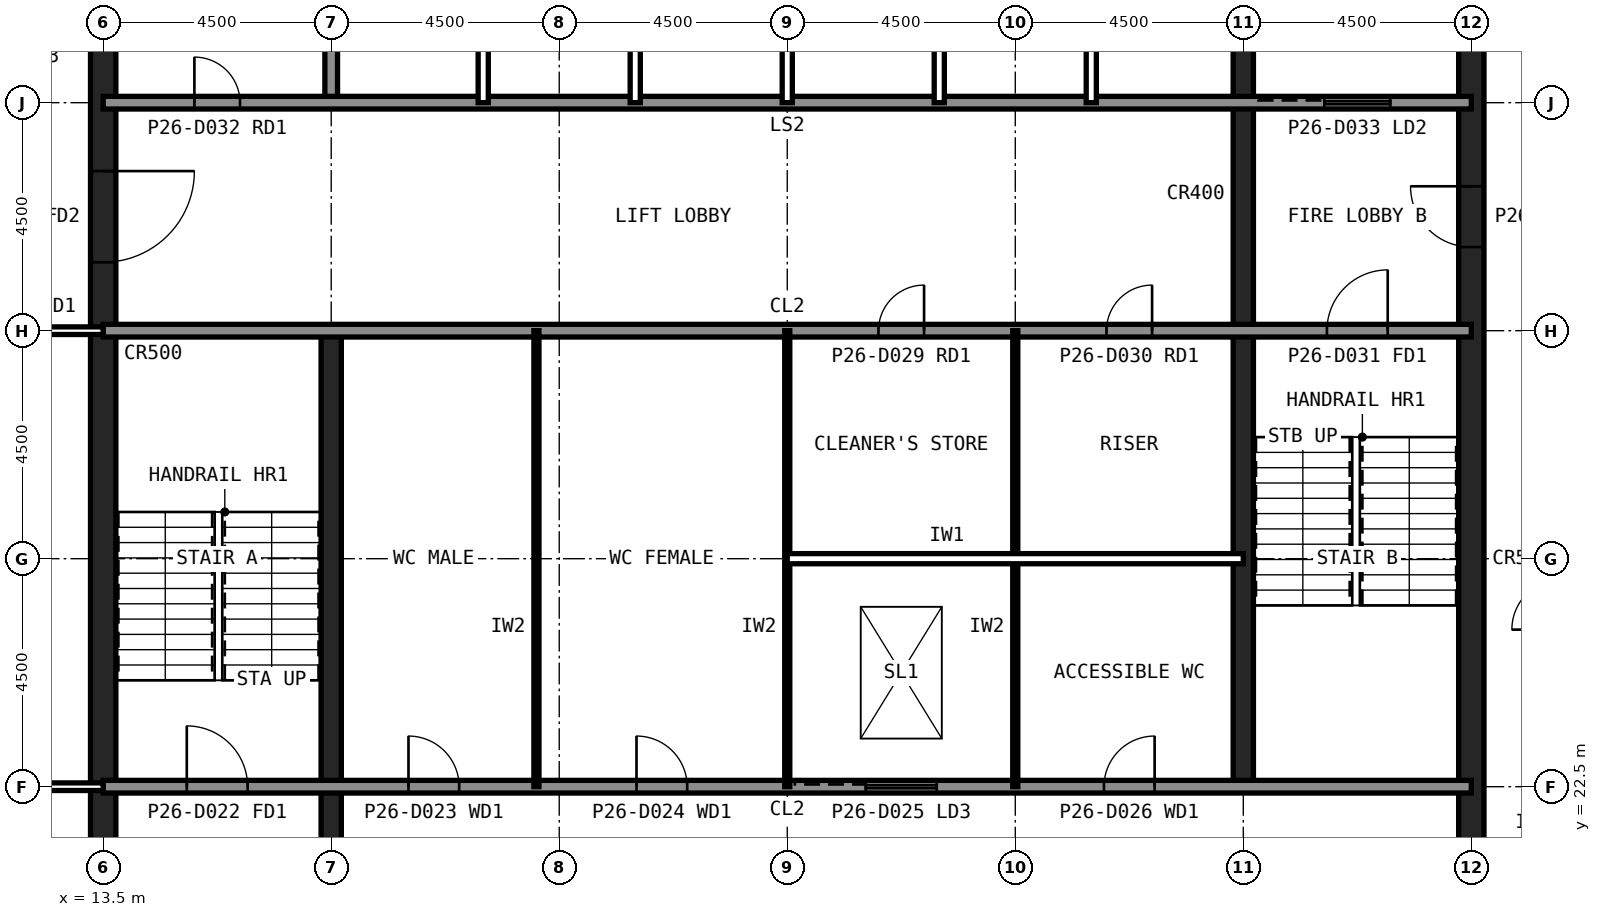
"""IFC4 building model, lengths in metres.
Left out: names, types, materials, properties, quantities, classifications, styles, units other than length and angle.
Written with IfcOpenShell. Run it as: python <this file> out.ifc"""

import sys

from ifc_helpers import new_model, si_unit, direction, frame, frame_2d, origin, place, context, subcontext, project, spatial, rectangle, extrude, element, fill, save


model = new_model("IFC4")
c1 = context("Model", 3, precision=1e-05, world=origin(), true_north=direction((0.0, 1.0)))
c2 = subcontext(c1, "Body", "Model", "MODEL_VIEW")
j1 = project(units=[si_unit("LENGTHUNIT", "METRE"), si_unit("PLANEANGLEUNIT", "RADIAN")], contexts=[c1])
p1 = place(None, origin())
s1 = spatial("IfcSite", under=j1, at=p1, CompositionType="ELEMENT")
p2 = place(p1, origin())
s2 = spatial("IfcBuilding", under=s1, at=p2, CompositionType="ELEMENT")
p3 = place(p2, frame((0.0, 0.0, 115.6)))
s3 = spatial("IfcBuildingStorey", under=s2, at=p3, CompositionType="ELEMENT", Elevation=115.6)
p4 = place(p3, frame((40.5, 13.5, 0.0), z_axis=(0.0, 0.0, 1.0), x_axis=(0.0, 1.0, 0.0)))
e1 = element("IfcWall", 1, at=p4, inside=s3, PredefinedType="SHEAR", context=c2, shape_type="SweptSolid", body=[
    extrude(rectangle(XDim=27.0, YDim=0.5, at=frame_2d((13.5, 0.0))), origin(), (0.0, 0.0, 1.0), 4.0),
])
p5 = place(p4, frame((5.85, 0.0, 0.0)))
e2 = element("IfcOpeningElement", 2, at=p5, cuts=e1, PredefinedType="OPENING", context=c2, shape_type="SweptSolid", body=[
    extrude(rectangle(XDim=1.8, YDim=2.1, at=frame_2d((0.9, 1.05))), frame((0.0, 0.26, 0.0), z_axis=(0.0, -1.0, 0.0), x_axis=(1.0, 0.0, 0.0)), (0.0, 0.0, 1.0), 0.52),
])
p6 = place(p4, frame((19.65, 0.0, 0.0)))
e3 = element("IfcOpeningElement", 3, at=p6, cuts=e1, PredefinedType="OPENING", context=c2, shape_type="SweptSolid", body=[
    extrude(rectangle(XDim=1.2, YDim=2.1, at=frame_2d((0.6, 1.05))), frame((0.0, 0.26, 0.0), z_axis=(0.0, -1.0, 0.0), x_axis=(1.0, 0.0, 0.0)), (0.0, 0.0, 1.0), 0.52),
])
p7 = place(p3, frame((13.5, 40.5, 0.0), z_axis=(0.0, 0.0, 1.0), x_axis=(0.0, -1.0, 0.0)))
e4 = element("IfcWall", 4, at=p7, inside=s3, PredefinedType="SHEAR", context=c2, shape_type="SweptSolid", body=[
    extrude(rectangle(XDim=27.0, YDim=0.5, at=frame_2d((13.5, 0.0))), origin(), (0.0, 0.0, 1.0), 4.0),
])
p8 = place(p7, frame((19.65, 0.0, 0.0)))
e5 = element("IfcOpeningElement", 5, at=p8, cuts=e4, PredefinedType="OPENING", context=c2, shape_type="SweptSolid", body=[
    extrude(rectangle(XDim=1.2, YDim=2.1, at=frame_2d((0.6, 1.05))), frame((0.0, 0.26, 0.0), z_axis=(0.0, -1.0, 0.0), x_axis=(1.0, 0.0, 0.0)), (0.0, 0.0, 1.0), 0.52),
])
p9 = place(p7, frame((5.85, 0.0, 0.0)))
e6 = element("IfcOpeningElement", 6, at=p9, cuts=e4, PredefinedType="OPENING", context=c2, shape_type="SweptSolid", body=[
    extrude(rectangle(XDim=1.8, YDim=2.1, at=frame_2d((0.9, 1.05))), frame((0.0, 0.26, 0.0), z_axis=(0.0, -1.0, 0.0), x_axis=(1.0, 0.0, 0.0)), (0.0, 0.0, 1.0), 0.52),
])
p10 = place(p3, frame((18.0, 13.5, 0.0), z_axis=(0.0, 0.0, 1.0), x_axis=(0.0, 1.0, 0.0)))
e7 = element("IfcWall", 7, at=p10, inside=s3, PredefinedType="SHEAR", context=c2, shape_type="SweptSolid", body=[
    extrude(rectangle(XDim=18.0, YDim=0.4, at=frame_2d((9.0, 0.0))), origin(), (0.0, 0.0, 1.0), 4.0),
])
p11 = place(p3, frame((18.0, 36.0, 0.0), z_axis=(0.0, 0.0, 1.0), x_axis=(0.0, 1.0, 0.0)))
e8 = element("IfcWall", 8, at=p11, inside=s3, PredefinedType="SOLIDWALL", context=c2, shape_type="SweptSolid", body=[
    extrude(rectangle(XDim=4.5, YDim=0.25, at=frame_2d((2.25, 0.0))), origin(), (0.0, 0.0, 1.0), 3.84),
])
p12 = place(p3, frame((36.0, 22.5, 0.0), z_axis=(0.0, 0.0, 1.0), x_axis=(0.0, 1.0, 0.0)))
e9 = element("IfcWall", 9, at=p12, inside=s3, PredefinedType="SHEAR", context=c2, shape_type="SweptSolid", body=[
    extrude(rectangle(XDim=18.0, YDim=0.4, at=frame_2d((9.0, 0.0))), origin(), (0.0, 0.0, 1.0), 4.0),
])
p13 = place(p3, frame((13.5, 36.0, 0.0), z_axis=(0.0, 0.0, 1.0), x_axis=(1.0, 0.0, 0.0)))
e10 = element("IfcWall", 10, at=p13, inside=s3, PredefinedType="SOLIDWALL", context=c2, shape_type="SweptSolid", body=[
    extrude(rectangle(XDim=27.0, YDim=0.25, at=frame_2d((13.5, 0.0))), origin(), (0.0, 0.0, 1.0), 3.84),
])
p14 = place(p13, frame((1.8, 0.0, 0.0)))
e11 = element("IfcOpeningElement", 11, at=p14, cuts=e10, PredefinedType="OPENING", context=c2, shape_type="SweptSolid", body=[
    extrude(rectangle(XDim=0.9, YDim=2.1, at=frame_2d((0.45, 1.05))), frame((0.0, 0.135, 0.0), z_axis=(0.0, -1.0, 0.0), x_axis=(1.0, 0.0, 0.0)), (0.0, 0.0, 1.0), 0.27),
])
p15 = place(p13, frame((24.1, 0.0, 0.0)))
e12 = element("IfcOpeningElement", 12, at=p15, cuts=e10, PredefinedType="OPENING", context=c2, shape_type="SweptSolid", body=[
    extrude(rectangle(XDim=1.3, YDim=2.2, at=frame_2d((0.65, 1.1))), frame((0.0, 0.135, 0.0), z_axis=(0.0, -1.0, 0.0), x_axis=(1.0, 0.0, 0.0)), (0.0, 0.0, 1.0), 0.27),
])
p16 = place(p3, frame((13.5, 22.5, 0.0), z_axis=(0.0, 0.0, 1.0), x_axis=(1.0, 0.0, 0.0)))
e13 = element("IfcWall", 13, at=p16, inside=s3, PredefinedType="SOLIDWALL", context=c2, shape_type="SweptSolid", body=[
    extrude(rectangle(XDim=27.0, YDim=0.25, at=frame_2d((13.5, 0.0))), origin(), (0.0, 0.0, 1.0), 3.84),
])
p17 = place(p16, frame((1.65, 0.0, 0.0)))
e14 = element("IfcOpeningElement", 14, at=p17, cuts=e13, PredefinedType="OPENING", context=c2, shape_type="SweptSolid", body=[
    extrude(rectangle(XDim=1.2, YDim=2.1, at=frame_2d((0.6, 1.05))), frame((0.0, 0.135, 0.0), z_axis=(0.0, -1.0, 0.0), x_axis=(1.0, 0.0, 0.0)), (0.0, 0.0, 1.0), 0.27),
])
p18 = place(p16, frame((6.025, 0.0, 0.0)))
e15 = element("IfcOpeningElement", 15, at=p18, cuts=e13, PredefinedType="OPENING", context=c2, shape_type="SweptSolid", body=[
    extrude(rectangle(XDim=1.0, YDim=2.1, at=frame_2d((0.5, 1.05))), frame((0.0, 0.135, 0.0), z_axis=(0.0, -1.0, 0.0), x_axis=(1.0, 0.0, 0.0)), (0.0, 0.0, 1.0), 0.27),
])
p19 = place(p16, frame((10.525, 0.0, 0.0)))
e16 = element("IfcOpeningElement", 16, at=p19, cuts=e13, PredefinedType="OPENING", context=c2, shape_type="SweptSolid", body=[
    extrude(rectangle(XDim=1.0, YDim=2.1, at=frame_2d((0.5, 1.05))), frame((0.0, 0.135, 0.0), z_axis=(0.0, -1.0, 0.0), x_axis=(1.0, 0.0, 0.0)), (0.0, 0.0, 1.0), 0.27),
])
p20 = place(p16, frame((19.75, 0.0, 0.0)))
e17 = element("IfcOpeningElement", 17, at=p20, cuts=e13, PredefinedType="OPENING", context=c2, shape_type="SweptSolid", body=[
    extrude(rectangle(XDim=1.0, YDim=2.1, at=frame_2d((0.5, 1.05))), frame((0.0, 0.135, 0.0), z_axis=(0.0, -1.0, 0.0), x_axis=(1.0, 0.0, 0.0)), (0.0, 0.0, 1.0), 0.27),
])
p21 = place(p16, frame((15.05, 0.0, 0.0)))
e18 = element("IfcOpeningElement", 18, at=p21, cuts=e13, PredefinedType="OPENING", context=c2, shape_type="SweptSolid", body=[
    extrude(rectangle(XDim=1.4, YDim=2.4, at=frame_2d((0.7, 1.2))), frame((0.0, 0.135, 0.0), z_axis=(0.0, -1.0, 0.0), x_axis=(1.0, 0.0, 0.0)), (0.0, 0.0, 1.0), 0.27),
])
p22 = place(p3, frame((13.5, 31.5, 0.0), z_axis=(0.0, 0.0, 1.0), x_axis=(1.0, 0.0, 0.0)))
e19 = element("IfcWall", 19, at=p22, inside=s3, PredefinedType="SOLIDWALL", context=c2, shape_type="SweptSolid", body=[
    extrude(rectangle(XDim=27.0, YDim=0.25, at=frame_2d((13.5, 0.0))), origin(), (0.0, 0.0, 1.0), 3.84),
])
p23 = place(p22, frame((24.15, 0.0, 0.0)))
e20 = element("IfcOpeningElement", 20, at=p23, cuts=e19, PredefinedType="OPENING", context=c2, shape_type="SweptSolid", body=[
    extrude(rectangle(XDim=1.2, YDim=2.1, at=frame_2d((0.6, 1.05))), frame((0.0, 0.135, 0.0), z_axis=(0.0, -1.0, 0.0), x_axis=(1.0, 0.0, 0.0)), (0.0, 0.0, 1.0), 0.27),
])
p24 = place(p22, frame((15.3, 0.0, 0.0)))
e21 = element("IfcOpeningElement", 21, at=p24, cuts=e19, PredefinedType="OPENING", context=c2, shape_type="SweptSolid", body=[
    extrude(rectangle(XDim=0.9, YDim=2.1, at=frame_2d((0.45, 1.05))), frame((0.0, 0.135, 0.0), z_axis=(0.0, -1.0, 0.0), x_axis=(1.0, 0.0, 0.0)), (0.0, 0.0, 1.0), 0.27),
])
p25 = place(p22, frame((19.8, 0.0, 0.0)))
e22 = element("IfcOpeningElement", 22, at=p25, cuts=e19, PredefinedType="OPENING", context=c2, shape_type="SweptSolid", body=[
    extrude(rectangle(XDim=0.9, YDim=2.1, at=frame_2d((0.45, 1.05))), frame((0.0, 0.135, 0.0), z_axis=(0.0, -1.0, 0.0), x_axis=(1.0, 0.0, 0.0)), (0.0, 0.0, 1.0), 0.27),
])
for number, where, z_axis, x_axis in (
    (23, (21.0, 36.0, 0.0), (0.0, 0.0, 1.0), (0.0, 1.0, 0.0)),
    (24, (24.0, 36.0, 0.0), (0.0, 0.0, 1.0), (0.0, 1.0, 0.0)),
    (25, (27.0, 36.0, 0.0), (0.0, 0.0, 1.0), (0.0, 1.0, 0.0)),
    (26, (30.0, 36.0, 0.0), (0.0, 0.0, 1.0), (0.0, 1.0, 0.0)),
    (27, (33.0, 36.0, 0.0), (0.0, 0.0, 1.0), (0.0, 1.0, 0.0)),
):
    element("IfcWall", number, at=place(p3, frame(where, z_axis=z_axis, x_axis=x_axis)), inside=s3, PredefinedType="PARTITIONING", context=c2, shape_type="SweptSolid", body=[
        extrude(rectangle(XDim=4.5, YDim=0.2, at=frame_2d((2.25, 0.0))), origin(), (0.0, 0.0, 1.0), 3.84),
    ])
for number, where, z_axis, x_axis in (
    (28, (22.05, 22.5, 0.0), (0.0, 0.0, 1.0), (0.0, 1.0, 0.0)),
    (29, (27.0, 22.5, 0.0), (0.0, 0.0, 1.0), (0.0, 1.0, 0.0)),
    (30, (31.5, 22.5, 0.0), (0.0, 0.0, 1.0), (0.0, 1.0, 0.0)),
):
    element("IfcWall", number, at=place(p3, frame(where, z_axis=z_axis, x_axis=x_axis)), inside=s3, PredefinedType="PLUMBINGWALL", context=c2, shape_type="SweptSolid", body=[
        extrude(rectangle(XDim=9.0, YDim=0.1, at=frame_2d((4.5, 0.0))), origin(), (0.0, 0.0, 1.0), 3.84),
    ])
p26 = place(p3, frame((27.0, 27.0, 0.0), z_axis=(0.0, 0.0, 1.0), x_axis=(1.0, 0.0, 0.0)))
e31 = element("IfcWall", 31, at=p26, inside=s3, PredefinedType="PARTITIONING", context=c2, shape_type="SweptSolid", body=[
    extrude(rectangle(XDim=9.0, YDim=0.2, at=frame_2d((4.5, 0.0))), origin(), (0.0, 0.0, 1.0), 3.84),
])
p27 = place(p3, frame((9.9, 22.5, 0.0), z_axis=(0.0, 0.0, 1.0), x_axis=(1.0, 0.0, 0.0)))
e32 = element("IfcWall", 32, at=p27, inside=s3, PredefinedType="PARTITIONING", context=c2, shape_type="SweptSolid", body=[
    extrude(rectangle(XDim=3.6, YDim=0.15, at=frame_2d((1.8, 0.0))), origin(), (0.0, 0.0, 1.0), 2.989),
])
p28 = place(p3, frame((13.5, 31.5, 0.0), z_axis=(0.0, 0.0, 1.0), x_axis=(-1.0, 0.0, 0.0)))
e33 = element("IfcWall", 33, at=p28, inside=s3, PredefinedType="PARTITIONING", context=c2, shape_type="SweptSolid", body=[
    extrude(rectangle(XDim=3.6, YDim=0.15, at=frame_2d((1.8, 0.0))), origin(), (0.0, 0.0, 1.0), 2.989),
])
p29 = place(p28, frame((1.3, 0.0, 0.0)))
e34 = element("IfcOpeningElement", 34, at=p29, cuts=e33, PredefinedType="OPENING", context=c2, shape_type="SweptSolid", body=[
    extrude(rectangle(XDim=1.0, YDim=2.1, at=frame_2d((0.5, 1.05))), frame((0.0, 0.085, 0.0), z_axis=(0.0, -1.0, 0.0), x_axis=(1.0, 0.0, 0.0)), (0.0, 0.0, 1.0), 0.17),
])
p30 = place(p9, origin())
e35 = element("IfcDoor", 35, at=p30, inside=s3, OperationType="SINGLE_SWING_LEFT", PredefinedType="DOOR", context=c2, shape_type="SweptSolid", body=[
    extrude(rectangle(XDim=1.8, YDim=2.1, at=frame_2d((0.9, 1.05))), frame((0.0, 0.025, 0.0), z_axis=(0.0, -1.0, 0.0), x_axis=(1.0, 0.0, 0.0)), (0.0, 0.0, 1.0), 0.05),
])
fill(e6, e35)
p31 = place(p6, origin())
e36 = element("IfcDoor", 36, at=p31, inside=s3, OperationType="SINGLE_SWING_RIGHT", PredefinedType="DOOR", context=c2, shape_type="SweptSolid", body=[
    extrude(rectangle(XDim=1.2, YDim=2.1, at=frame_2d((0.6, 1.05))), frame((0.0, 0.025, 0.0), z_axis=(0.0, -1.0, 0.0), x_axis=(1.0, 0.0, 0.0)), (0.0, 0.0, 1.0), 0.05),
])
fill(e3, e36)
p32 = place(p17, origin())
e37 = element("IfcDoor", 37, at=p32, inside=s3, OperationType="SINGLE_SWING_LEFT", PredefinedType="DOOR", context=c2, shape_type="SweptSolid", body=[
    extrude(rectangle(XDim=1.2, YDim=2.1, at=frame_2d((0.6, 1.05))), frame((0.0, 0.025, 0.0), z_axis=(0.0, -1.0, 0.0), x_axis=(1.0, 0.0, 0.0)), (0.0, 0.0, 1.0), 0.05),
])
fill(e14, e37)
p33 = place(p23, origin())
e38 = element("IfcDoor", 38, at=p33, inside=s3, OperationType="SINGLE_SWING_RIGHT", PredefinedType="DOOR", context=c2, shape_type="SweptSolid", body=[
    extrude(rectangle(XDim=1.2, YDim=2.1, at=frame_2d((0.6, 1.05))), frame((0.0, 0.025, 0.0), z_axis=(0.0, -1.0, 0.0), x_axis=(1.0, 0.0, 0.0)), (0.0, 0.0, 1.0), 0.05),
])
fill(e20, e38)
p34 = place(p18, origin())
e39 = element("IfcDoor", 39, at=p34, inside=s3, OperationType="SINGLE_SWING_LEFT", PredefinedType="DOOR", context=c2, shape_type="SweptSolid", body=[
    extrude(rectangle(XDim=1.0, YDim=2.1, at=frame_2d((0.5, 1.05))), frame((0.0, 0.025, 0.0), z_axis=(0.0, -1.0, 0.0), x_axis=(1.0, 0.0, 0.0)), (0.0, 0.0, 1.0), 0.05),
])
fill(e15, e39)
p35 = place(p19, origin())
e40 = element("IfcDoor", 40, at=p35, inside=s3, OperationType="SINGLE_SWING_LEFT", PredefinedType="DOOR", context=c2, shape_type="SweptSolid", body=[
    extrude(rectangle(XDim=1.0, YDim=2.1, at=frame_2d((0.5, 1.05))), frame((0.0, 0.025, 0.0), z_axis=(0.0, -1.0, 0.0), x_axis=(1.0, 0.0, 0.0)), (0.0, 0.0, 1.0), 0.05),
])
fill(e16, e40)
p36 = place(p20, origin())
e41 = element("IfcDoor", 41, at=p36, inside=s3, OperationType="SINGLE_SWING_RIGHT", PredefinedType="DOOR", context=c2, shape_type="SweptSolid", body=[
    extrude(rectangle(XDim=1.0, YDim=2.1, at=frame_2d((0.5, 1.05))), frame((0.0, 0.025, 0.0), z_axis=(0.0, -1.0, 0.0), x_axis=(1.0, 0.0, 0.0)), (0.0, 0.0, 1.0), 0.05),
])
fill(e17, e41)
p37 = place(p24, origin())
e42 = element("IfcDoor", 42, at=p37, inside=s3, OperationType="SINGLE_SWING_RIGHT", PredefinedType="DOOR", context=c2, shape_type="SweptSolid", body=[
    extrude(rectangle(XDim=0.9, YDim=2.1, at=frame_2d((0.45, 1.05))), frame((0.0, 0.025, 0.0), z_axis=(0.0, -1.0, 0.0), x_axis=(1.0, 0.0, 0.0)), (0.0, 0.0, 1.0), 0.05),
])
fill(e21, e42)
p38 = place(p25, origin())
e43 = element("IfcDoor", 43, at=p38, inside=s3, OperationType="SINGLE_SWING_RIGHT", PredefinedType="DOOR", context=c2, shape_type="SweptSolid", body=[
    extrude(rectangle(XDim=0.9, YDim=2.1, at=frame_2d((0.45, 1.05))), frame((0.0, 0.025, 0.0), z_axis=(0.0, -1.0, 0.0), x_axis=(1.0, 0.0, 0.0)), (0.0, 0.0, 1.0), 0.05),
])
fill(e22, e43)
p39 = place(p14, origin())
e44 = element("IfcDoor", 44, at=p39, inside=s3, OperationType="SINGLE_SWING_LEFT", PredefinedType="DOOR", context=c2, shape_type="SweptSolid", body=[
    extrude(rectangle(XDim=0.9, YDim=2.1, at=frame_2d((0.45, 1.05))), frame((0.0, 0.025, 0.0), z_axis=(0.0, -1.0, 0.0), x_axis=(1.0, 0.0, 0.0)), (0.0, 0.0, 1.0), 0.05),
])
fill(e11, e44)
p40 = place(p15, origin())
e45 = element("IfcDoor", 45, at=p40, inside=s3, OperationType="SLIDING_TO_LEFT", PredefinedType="DOOR", context=c2, shape_type="SweptSolid", body=[
    extrude(rectangle(XDim=1.3, YDim=2.2, at=frame_2d((0.65, 1.1))), frame((0.0, 0.025, 0.0), z_axis=(0.0, -1.0, 0.0), x_axis=(1.0, 0.0, 0.0)), (0.0, 0.0, 1.0), 0.05),
])
fill(e12, e45)
p41 = place(p21, origin())
e46 = element("IfcDoor", 46, at=p41, inside=s3, OperationType="SLIDING_TO_LEFT", PredefinedType="DOOR", context=c2, shape_type="SweptSolid", body=[
    extrude(rectangle(XDim=1.4, YDim=2.4, at=frame_2d((0.7, 1.2))), frame((0.0, 0.025, 0.0), z_axis=(0.0, -1.0, 0.0), x_axis=(1.0, 0.0, 0.0)), (0.0, 0.0, 1.0), 0.05),
])
fill(e18, e46)
save(model, sys.argv[1])
